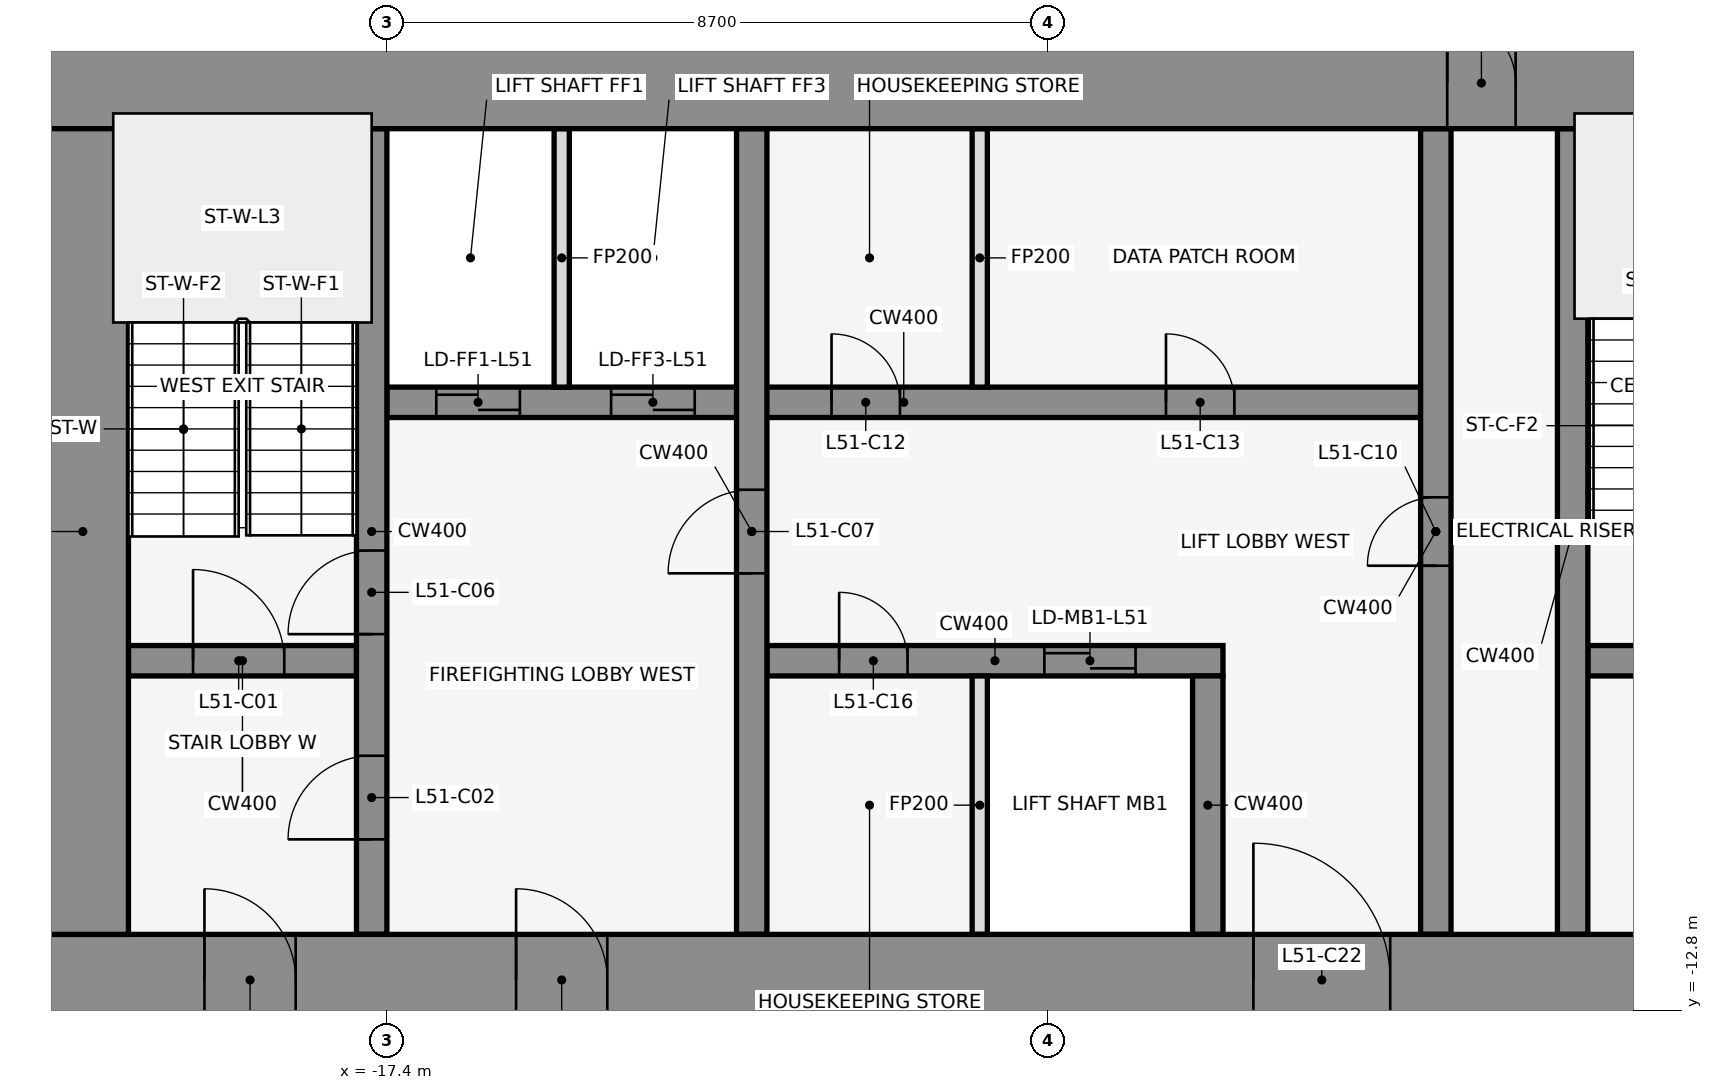
"""IFC4 building model, lengths in metres.
Left out: names, types, materials, properties, quantities, classifications, styles, units other than length and angle.
Written with IfcOpenShell. Run it as: python <this file> out.ifc"""

import sys

from ifc_helpers import new_model, si_unit, direction, frame, frame_2d, origin, place, context, subcontext, project, spatial, rectangle, extrude, element, fill, save


model = new_model("IFC4")
c1 = context("Model", 3, precision=1e-05, world=origin(), true_north=direction((0.0, 1.0)))
c2 = subcontext(c1, "Body", "Model", "MODEL_VIEW")
j1 = project(units=[si_unit("LENGTHUNIT", "METRE"), si_unit("PLANEANGLEUNIT", "RADIAN")], contexts=[c1])
p1 = place(None, origin())
s1 = spatial("IfcSite", under=j1, at=p1, CompositionType="ELEMENT")
p2 = place(p1, origin())
s2 = spatial("IfcBuilding", under=s1, at=p2, CompositionType="ELEMENT")
p3 = place(p2, frame((0.0, 0.0, 227.8)))
s3 = spatial("IfcBuildingStorey", under=s2, at=p3, CompositionType="ELEMENT", Elevation=227.8)
for number, where, z_axis, x_axis in (
    (1, (-0.068, -0.105, 0.0), (0.0, 0.0, 1.0), (-0.84, 0.543, 0.0)),
    (2, (-14.599, 1.08, 0.0), (0.0, 0.0, 1.0), (-0.84, -0.543, 0.0)),
):
    element("IfcWall", number, at=place(p3, frame(where, z_axis=z_axis, x_axis=x_axis)), inside=s3, PredefinedType="STANDARD", context=c2, shape_type="SweptSolid", body=[
        extrude(rectangle(XDim=2.183, YDim=0.25, at=frame_2d((1.091, 0.0))), origin(), (0.0, 0.0, 1.0), 3.95),
    ])
p4 = place(p3, frame((-20.8, -8.2, 0.0), z_axis=(0.0, 0.0, 1.0), x_axis=(1.0, 0.0, 0.0)))
e3 = element("IfcWall", 3, at=p4, inside=s3, PredefinedType="SHEAR", context=c2, shape_type="SweptSolid", body=[
    extrude(rectangle(XDim=3.0, YDim=0.4, at=frame_2d((1.5, 0.0))), origin(), (0.0, 0.0, 1.0), 4.1),
])
p5 = place(p4, frame((0.85, 0.0, 0.0)))
e4 = element("IfcOpeningElement", 4, at=p5, cuts=e3, PredefinedType="OPENING", context=c2, shape_type="SweptSolid", body=[
    extrude(rectangle(XDim=1.2, YDim=2.1, at=frame_2d((0.6, 1.05))), frame((0.0, 0.212, 0.0), z_axis=(0.0, -1.0, 0.0), x_axis=(1.0, 0.0, 0.0)), (0.0, 0.0, 1.0), 0.424),
])
p6 = place(p3, frame((-12.4, -8.2, 0.0), z_axis=(0.0, 0.0, 1.0), x_axis=(1.0, 0.0, 0.0)))
e5 = element("IfcWall", 5, at=p6, inside=s3, PredefinedType="SHEAR", context=c2, shape_type="SweptSolid", body=[
    extrude(rectangle(XDim=6.0, YDim=0.4, at=frame_2d((3.0, 0.0))), origin(), (0.0, 0.0, 1.0), 4.1),
])
p7 = place(p6, frame((3.65, 0.0, 0.0)))
e6 = element("IfcOpeningElement", 6, at=p7, cuts=e5, PredefinedType="OPENING", context=c2, shape_type="SweptSolid", body=[
    extrude(rectangle(XDim=1.2, YDim=2.1, at=frame_2d((0.6, 1.05))), frame((0.0, 0.212, 0.0), z_axis=(0.0, -1.0, 0.0), x_axis=(1.0, 0.0, 0.0)), (0.0, 0.0, 1.0), 0.424),
])
p8 = place(p6, frame((0.95, 0.0, 0.0)))
e7 = element("IfcOpeningElement", 7, at=p8, cuts=e5, PredefinedType="OPENING", context=c2, shape_type="SweptSolid", body=[
    extrude(rectangle(XDim=0.9, YDim=2.1, at=frame_2d((0.45, 1.05))), frame((0.0, 0.212, 0.0), z_axis=(0.0, -1.0, 0.0), x_axis=(1.0, 0.0, 0.0)), (0.0, 0.0, 1.0), 0.424),
])
p9 = place(p3, frame((-1.6, -8.2, 0.0), z_axis=(0.0, 0.0, 1.0), x_axis=(1.0, 0.0, 0.0)))
e8 = element("IfcWall", 8, at=p9, inside=s3, PredefinedType="SHEAR", context=c2, shape_type="SweptSolid", body=[
    extrude(rectangle(XDim=3.2, YDim=0.4, at=frame_2d((1.6, 0.0))), origin(), (0.0, 0.0, 1.0), 4.1),
])
p10 = place(p9, frame((1.05, 0.0, 0.0)))
e9 = element("IfcOpeningElement", 9, at=p10, cuts=e8, PredefinedType="OPENING", context=c2, shape_type="SweptSolid", body=[
    extrude(rectangle(XDim=1.2, YDim=2.1, at=frame_2d((0.6, 1.05))), frame((0.0, 0.212, 0.0), z_axis=(0.0, -1.0, 0.0), x_axis=(1.0, 0.0, 0.0)), (0.0, 0.0, 1.0), 0.424),
])
p11 = place(p3, frame((-17.4, -4.8, 0.0), z_axis=(0.0, 0.0, 1.0), x_axis=(1.0, 0.0, 0.0)))
e10 = element("IfcWall", 10, at=p11, inside=s3, PredefinedType="SHEAR", context=c2, shape_type="SweptSolid", body=[
    extrude(rectangle(XDim=13.6, YDim=0.4, at=frame_2d((6.8, 0.0))), origin(), (0.0, 0.0, 1.0), 4.1),
])
p12 = place(p11, frame((0.65, 0.0, 0.0)))
e11 = element("IfcOpeningElement", 11, at=p12, cuts=e10, PredefinedType="OPENING", context=c2, shape_type="SweptSolid", body=[
    extrude(rectangle(XDim=1.1, YDim=2.1, at=frame_2d((0.55, 1.05))), frame((0.0, 0.212, 0.0), z_axis=(0.0, -1.0, 0.0), x_axis=(1.0, 0.0, 0.0)), (0.0, 0.0, 1.0), 0.424),
])
p13 = place(p11, frame((2.95, 0.0, 0.0)))
e12 = element("IfcOpeningElement", 12, at=p13, cuts=e10, PredefinedType="OPENING", context=c2, shape_type="SweptSolid", body=[
    extrude(rectangle(XDim=1.1, YDim=2.1, at=frame_2d((0.55, 1.05))), frame((0.0, 0.212, 0.0), z_axis=(0.0, -1.0, 0.0), x_axis=(1.0, 0.0, 0.0)), (0.0, 0.0, 1.0), 0.424),
])
p14 = place(p11, frame((5.85, 0.0, 0.0)))
e13 = element("IfcOpeningElement", 13, at=p14, cuts=e10, PredefinedType="OPENING", context=c2, shape_type="SweptSolid", body=[
    extrude(rectangle(XDim=0.9, YDim=2.1, at=frame_2d((0.45, 1.05))), frame((0.0, 0.212, 0.0), z_axis=(0.0, -1.0, 0.0), x_axis=(1.0, 0.0, 0.0)), (0.0, 0.0, 1.0), 0.424),
])
p15 = place(p11, frame((10.25, 0.0, 0.0)))
e14 = element("IfcOpeningElement", 14, at=p15, cuts=e10, PredefinedType="OPENING", context=c2, shape_type="SweptSolid", body=[
    extrude(rectangle(XDim=0.9, YDim=2.1, at=frame_2d((0.45, 1.05))), frame((0.0, 0.212, 0.0), z_axis=(0.0, -1.0, 0.0), x_axis=(1.0, 0.0, 0.0)), (0.0, 0.0, 1.0), 0.424),
])
p16 = place(p3, frame((-17.6, -11.8, 0.0), z_axis=(0.0, 0.0, 1.0), x_axis=(0.0, 1.0, 0.0)))
e15 = element("IfcWall", 15, at=p16, inside=s3, PredefinedType="SHEAR", context=c2, shape_type="SweptSolid", body=[
    extrude(rectangle(XDim=10.6, YDim=0.4, at=frame_2d((5.3, 0.0))), origin(), (0.0, 0.0, 1.0), 4.1),
])
p17 = place(p16, frame((1.25, 0.0, 0.0)))
e16 = element("IfcOpeningElement", 16, at=p17, cuts=e15, PredefinedType="OPENING", context=c2, shape_type="SweptSolid", body=[
    extrude(rectangle(XDim=1.1, YDim=2.1, at=frame_2d((0.55, 1.05))), frame((0.0, 0.212, 0.0), z_axis=(0.0, -1.0, 0.0), x_axis=(1.0, 0.0, 0.0)), (0.0, 0.0, 1.0), 0.424),
])
p18 = place(p16, frame((3.95, 0.0, 0.0)))
e17 = element("IfcOpeningElement", 17, at=p18, cuts=e15, PredefinedType="OPENING", context=c2, shape_type="SweptSolid", body=[
    extrude(rectangle(XDim=1.1, YDim=2.1, at=frame_2d((0.55, 1.05))), frame((0.0, 0.212, 0.0), z_axis=(0.0, -1.0, 0.0), x_axis=(1.0, 0.0, 0.0)), (0.0, 0.0, 1.0), 0.424),
])
p19 = place(p3, frame((-15.1, -4.6, 0.0), z_axis=(0.0, 0.0, 1.0), x_axis=(0.0, 1.0, 0.0)))
e18 = element("IfcWall", 18, at=p19, inside=s3, PredefinedType="PARTITIONING", context=c2, shape_type="SweptSolid", body=[
    extrude(rectangle(XDim=3.4, YDim=0.2, at=frame_2d((1.7, 0.0))), origin(), (0.0, 0.0, 1.0), 2.84),
])
p20 = place(p3, frame((-12.6, -11.8, 0.0), z_axis=(0.0, 0.0, 1.0), x_axis=(0.0, 1.0, 0.0)))
e19 = element("IfcWall", 19, at=p20, inside=s3, PredefinedType="SHEAR", context=c2, shape_type="SweptSolid", body=[
    extrude(rectangle(XDim=10.6, YDim=0.4, at=frame_2d((5.3, 0.0))), origin(), (0.0, 0.0, 1.0), 4.1),
])
p21 = place(p20, frame((4.75, 0.0, 0.0)))
e20 = element("IfcOpeningElement", 20, at=p21, cuts=e19, PredefinedType="OPENING", context=c2, shape_type="SweptSolid", body=[
    extrude(rectangle(XDim=1.1, YDim=2.1, at=frame_2d((0.55, 1.05))), frame((0.0, 0.212, 0.0), z_axis=(0.0, -1.0, 0.0), x_axis=(1.0, 0.0, 0.0)), (0.0, 0.0, 1.0), 0.424),
])
for number, where, z_axis, x_axis in (
    (21, (-9.6, -11.8, 0.0), (0.0, 0.0, 1.0), (0.0, 1.0, 0.0)),
    (22, (-9.6, -4.6, 0.0), (0.0, 0.0, 1.0), (0.0, 1.0, 0.0)),
):
    element("IfcWall", number, at=place(p3, frame(where, z_axis=z_axis, x_axis=x_axis)), inside=s3, PredefinedType="PARTITIONING", context=c2, shape_type="SweptSolid", body=[
        extrude(rectangle(XDim=3.4, YDim=0.2, at=frame_2d((1.7, 0.0))), origin(), (0.0, 0.0, 1.0), 2.84),
    ])
p22 = place(p3, frame((-6.6, -11.8, 0.0), z_axis=(0.0, 0.0, 1.0), x_axis=(0.0, 1.0, 0.0)))
e23 = element("IfcWall", 23, at=p22, inside=s3, PredefinedType="SHEAR", context=c2, shape_type="SweptSolid", body=[
    extrude(rectangle(XDim=3.4, YDim=0.4, at=frame_2d((1.7, 0.0))), origin(), (0.0, 0.0, 1.0), 4.1),
])
p23 = place(p3, frame((-3.6, -11.8, 0.0), z_axis=(0.0, 0.0, 1.0), x_axis=(0.0, 1.0, 0.0)))
e24 = element("IfcWall", 24, at=p23, inside=s3, PredefinedType="SHEAR", context=c2, shape_type="SweptSolid", body=[
    extrude(rectangle(XDim=10.6, YDim=0.4, at=frame_2d((5.3, 0.0))), origin(), (0.0, 0.0, 1.0), 4.1),
])
p24 = place(p23, frame((4.85, 0.0, 0.0)))
e25 = element("IfcOpeningElement", 25, at=p24, cuts=e24, PredefinedType="OPENING", context=c2, shape_type="SweptSolid", body=[
    extrude(rectangle(XDim=0.9, YDim=2.1, at=frame_2d((0.45, 1.05))), frame((0.0, 0.212, 0.0), z_axis=(0.0, -1.0, 0.0), x_axis=(1.0, 0.0, 0.0)), (0.0, 0.0, 1.0), 0.424),
])
p25 = place(p3, frame((-1.8, -11.8, 0.0), z_axis=(0.0, 0.0, 1.0), x_axis=(0.0, 1.0, 0.0)))
e26 = element("IfcWall", 26, at=p25, inside=s3, PredefinedType="SHEAR", context=c2, shape_type="SweptSolid", body=[
    extrude(rectangle(XDim=10.6, YDim=0.4, at=frame_2d((5.3, 0.0))), origin(), (0.0, 0.0, 1.0), 4.1),
])
p26 = place(p3, frame((-22.0, -0.6, 0.0), z_axis=(0.0, 0.0, 1.0), x_axis=(1.0, 0.0, 0.0)))
e27 = element("IfcWall", 27, at=p26, inside=s3, PredefinedType="SHEAR", context=c2, shape_type="SweptSolid", body=[
    extrude(rectangle(XDim=44.0, YDim=1.2, at=frame_2d((22.0, 0.0))), origin(), (0.0, 0.0, 1.0), 4.1),
])
p27 = place(p26, frame((18.55, 0.0, 0.0)))
e28 = element("IfcOpeningElement", 28, at=p27, cuts=e27, PredefinedType="OPENING", context=c2, shape_type="SweptSolid", body=[
    extrude(rectangle(XDim=0.9, YDim=2.1, at=frame_2d((0.45, 1.05))), frame((0.0, 0.612, 0.0), z_axis=(0.0, -1.0, 0.0), x_axis=(1.0, 0.0, 0.0)), (0.0, 0.0, 1.0), 1.224),
])
p28 = place(p26, frame((24.55, 0.0, 0.0)))
e29 = element("IfcOpeningElement", 29, at=p28, cuts=e27, PredefinedType="OPENING", context=c2, shape_type="SweptSolid", body=[
    extrude(rectangle(XDim=0.9, YDim=2.1, at=frame_2d((0.45, 1.05))), frame((0.0, 0.612, 0.0), z_axis=(0.0, -1.0, 0.0), x_axis=(1.0, 0.0, 0.0)), (0.0, 0.0, 1.0), 1.224),
])
p29 = place(p3, frame((-22.0, -12.4, 0.0), z_axis=(0.0, 0.0, 1.0), x_axis=(1.0, 0.0, 0.0)))
e30 = element("IfcWall", 30, at=p29, inside=s3, PredefinedType="SHEAR", context=c2, shape_type="SweptSolid", body=[
    extrude(rectangle(XDim=44.0, YDim=1.2, at=frame_2d((22.0, 0.0))), origin(), (0.0, 0.0, 1.0), 4.1),
])
p30 = place(p29, frame((2.2, 0.0, 0.0)))
e31 = element("IfcOpeningElement", 31, at=p30, cuts=e30, PredefinedType="OPENING", context=c2, shape_type="SweptSolid", body=[
    extrude(rectangle(XDim=1.2, YDim=2.1, at=frame_2d((0.6, 1.05))), frame((0.0, 0.612, 0.0), z_axis=(0.0, -1.0, 0.0), x_axis=(1.0, 0.0, 0.0)), (0.0, 0.0, 1.0), 1.224),
])
p31 = place(p29, frame((21.4, 0.0, 0.0)))
e32 = element("IfcOpeningElement", 32, at=p31, cuts=e30, PredefinedType="OPENING", context=c2, shape_type="SweptSolid", body=[
    extrude(rectangle(XDim=1.2, YDim=2.1, at=frame_2d((0.6, 1.05))), frame((0.0, 0.612, 0.0), z_axis=(0.0, -1.0, 0.0), x_axis=(1.0, 0.0, 0.0)), (0.0, 0.0, 1.0), 1.224),
])
p32 = place(p29, frame((40.6, 0.0, 0.0)))
e33 = element("IfcOpeningElement", 33, at=p32, cuts=e30, PredefinedType="OPENING", context=c2, shape_type="SweptSolid", body=[
    extrude(rectangle(XDim=1.2, YDim=2.1, at=frame_2d((0.6, 1.05))), frame((0.0, 0.612, 0.0), z_axis=(0.0, -1.0, 0.0), x_axis=(1.0, 0.0, 0.0)), (0.0, 0.0, 1.0), 1.224),
])
p33 = place(p29, frame((16.0, 0.0, 0.0)))
e34 = element("IfcOpeningElement", 34, at=p33, cuts=e30, PredefinedType="OPENING", context=c2, shape_type="SweptSolid", body=[
    extrude(rectangle(XDim=1.8, YDim=2.1, at=frame_2d((0.9, 1.05))), frame((0.0, 0.612, 0.0), z_axis=(0.0, -1.0, 0.0), x_axis=(1.0, 0.0, 0.0)), (0.0, 0.0, 1.0), 1.224),
])
p34 = place(p29, frame((6.3, 0.0, 0.0)))
e35 = element("IfcOpeningElement", 35, at=p34, cuts=e30, PredefinedType="OPENING", context=c2, shape_type="SweptSolid", body=[
    extrude(rectangle(XDim=1.2, YDim=2.1, at=frame_2d((0.6, 1.05))), frame((0.0, 0.612, 0.0), z_axis=(0.0, -1.0, 0.0), x_axis=(1.0, 0.0, 0.0)), (0.0, 0.0, 1.0), 1.224),
])
p35 = place(p29, frame((26.2, 0.0, 0.0)))
e36 = element("IfcOpeningElement", 36, at=p35, cuts=e30, PredefinedType="OPENING", context=c2, shape_type="SweptSolid", body=[
    extrude(rectangle(XDim=1.8, YDim=2.1, at=frame_2d((0.9, 1.05))), frame((0.0, 0.612, 0.0), z_axis=(0.0, -1.0, 0.0), x_axis=(1.0, 0.0, 0.0)), (0.0, 0.0, 1.0), 1.224),
])
p36 = place(p29, frame((36.5, 0.0, 0.0)))
e37 = element("IfcOpeningElement", 37, at=p36, cuts=e30, PredefinedType="OPENING", context=c2, shape_type="SweptSolid", body=[
    extrude(rectangle(XDim=1.2, YDim=2.1, at=frame_2d((0.6, 1.05))), frame((0.0, 0.612, 0.0), z_axis=(0.0, -1.0, 0.0), x_axis=(1.0, 0.0, 0.0)), (0.0, 0.0, 1.0), 1.224),
])
p37 = place(p3, frame((-21.4, -11.8, 0.0), z_axis=(0.0, 0.0, 1.0), x_axis=(0.0, 1.0, 0.0)))
e38 = element("IfcWall", 38, at=p37, inside=s3, PredefinedType="SHEAR", context=c2, shape_type="SweptSolid", body=[
    extrude(rectangle(XDim=10.6, YDim=1.2, at=frame_2d((5.3, 0.0))), origin(), (0.0, 0.0, 1.0), 4.1),
])
p38 = place(p5, origin())
e39 = element("IfcDoor", 39, at=p38, inside=s3, OperationType="SINGLE_SWING_LEFT", PredefinedType="DOOR", context=c2, shape_type="SweptSolid", body=[
    extrude(rectangle(XDim=1.2, YDim=2.1, at=frame_2d((0.6, 1.05))), frame((0.0, 0.025, 0.0), z_axis=(0.0, -1.0, 0.0), x_axis=(1.0, 0.0, 0.0)), (0.0, 0.0, 1.0), 0.05),
])
fill(e4, e39)
p39 = place(p17, frame((1.1, 0.0, 0.0), z_axis=(0.0, 0.0, 1.0), x_axis=(-1.0, 0.0, 0.0)))
e40 = element("IfcDoor", 40, at=p39, inside=s3, OperationType="SINGLE_SWING_LEFT", PredefinedType="DOOR", context=c2, shape_type="SweptSolid", body=[
    extrude(rectangle(XDim=1.1, YDim=2.1, at=frame_2d((0.55, 1.05))), frame((0.0, 0.025, 0.0), z_axis=(0.0, -1.0, 0.0), x_axis=(1.0, 0.0, 0.0)), (0.0, 0.0, 1.0), 0.05),
])
fill(e16, e40)
p40 = place(p12, origin())
e41 = element("IfcDoor", 41, at=p40, inside=s3, OperationType="DOUBLE_DOOR_SLIDING", PredefinedType="DOOR", context=c2, shape_type="SweptSolid", body=[
    extrude(rectangle(XDim=1.1, YDim=2.1, at=frame_2d((0.55, 1.05))), frame((0.0, 0.025, 0.0), z_axis=(0.0, -1.0, 0.0), x_axis=(1.0, 0.0, 0.0)), (0.0, 0.0, 1.0), 0.05),
])
fill(e11, e41)
p41 = place(p13, origin())
e42 = element("IfcDoor", 42, at=p41, inside=s3, OperationType="DOUBLE_DOOR_SLIDING", PredefinedType="DOOR", context=c2, shape_type="SweptSolid", body=[
    extrude(rectangle(XDim=1.1, YDim=2.1, at=frame_2d((0.55, 1.05))), frame((0.0, 0.025, 0.0), z_axis=(0.0, -1.0, 0.0), x_axis=(1.0, 0.0, 0.0)), (0.0, 0.0, 1.0), 0.05),
])
fill(e12, e42)
p42 = place(p7, origin())
e43 = element("IfcDoor", 43, at=p42, inside=s3, OperationType="DOUBLE_DOOR_SLIDING", PredefinedType="DOOR", context=c2, shape_type="SweptSolid", body=[
    extrude(rectangle(XDim=1.2, YDim=2.1, at=frame_2d((0.6, 1.05))), frame((0.0, 0.025, 0.0), z_axis=(0.0, -1.0, 0.0), x_axis=(1.0, 0.0, 0.0)), (0.0, 0.0, 1.0), 0.05),
])
fill(e6, e43)
p43 = place(p18, frame((1.1, 0.0, 0.0), z_axis=(0.0, 0.0, 1.0), x_axis=(-1.0, 0.0, 0.0)))
e44 = element("IfcDoor", 44, at=p43, inside=s3, OperationType="SINGLE_SWING_LEFT", PredefinedType="DOOR", context=c2, shape_type="SweptSolid", body=[
    extrude(rectangle(XDim=1.1, YDim=2.1, at=frame_2d((0.55, 1.05))), frame((0.0, 0.025, 0.0), z_axis=(0.0, -1.0, 0.0), x_axis=(1.0, 0.0, 0.0)), (0.0, 0.0, 1.0), 0.05),
])
fill(e17, e44)
p44 = place(p21, origin())
e45 = element("IfcDoor", 45, at=p44, inside=s3, OperationType="SINGLE_SWING_LEFT", PredefinedType="DOOR", context=c2, shape_type="SweptSolid", body=[
    extrude(rectangle(XDim=1.1, YDim=2.1, at=frame_2d((0.55, 1.05))), frame((0.0, 0.025, 0.0), z_axis=(0.0, -1.0, 0.0), x_axis=(1.0, 0.0, 0.0)), (0.0, 0.0, 1.0), 0.05),
])
fill(e20, e45)
p45 = place(p24, frame((0.9, 0.0, 0.0), z_axis=(0.0, 0.0, 1.0), x_axis=(-1.0, 0.0, 0.0)))
e46 = element("IfcDoor", 46, at=p45, inside=s3, OperationType="SINGLE_SWING_LEFT", PredefinedType="DOOR", context=c2, shape_type="SweptSolid", body=[
    extrude(rectangle(XDim=0.9, YDim=2.1, at=frame_2d((0.45, 1.05))), frame((0.0, 0.025, 0.0), z_axis=(0.0, -1.0, 0.0), x_axis=(1.0, 0.0, 0.0)), (0.0, 0.0, 1.0), 0.05),
])
fill(e25, e46)
p46 = place(p14, origin())
e47 = element("IfcDoor", 47, at=p46, inside=s3, OperationType="SINGLE_SWING_RIGHT", PredefinedType="DOOR", context=c2, shape_type="SweptSolid", body=[
    extrude(rectangle(XDim=0.9, YDim=2.1, at=frame_2d((0.45, 1.05))), frame((0.0, 0.025, 0.0), z_axis=(0.0, -1.0, 0.0), x_axis=(1.0, 0.0, 0.0)), (0.0, 0.0, 1.0), 0.05),
])
fill(e13, e47)
p47 = place(p15, origin())
e48 = element("IfcDoor", 48, at=p47, inside=s3, OperationType="SINGLE_SWING_LEFT", PredefinedType="DOOR", context=c2, shape_type="SweptSolid", body=[
    extrude(rectangle(XDim=0.9, YDim=2.1, at=frame_2d((0.45, 1.05))), frame((0.0, 0.025, 0.0), z_axis=(0.0, -1.0, 0.0), x_axis=(1.0, 0.0, 0.0)), (0.0, 0.0, 1.0), 0.05),
])
fill(e14, e48)
p48 = place(p8, frame((0.9, 0.0, 0.0), z_axis=(0.0, 0.0, 1.0), x_axis=(-1.0, 0.0, 0.0)))
e49 = element("IfcDoor", 49, at=p48, inside=s3, OperationType="SINGLE_SWING_LEFT", PredefinedType="DOOR", context=c2, shape_type="SweptSolid", body=[
    extrude(rectangle(XDim=0.9, YDim=2.1, at=frame_2d((0.45, 1.05))), frame((0.0, 0.025, 0.0), z_axis=(0.0, -1.0, 0.0), x_axis=(1.0, 0.0, 0.0)), (0.0, 0.0, 1.0), 0.05),
])
fill(e7, e49)
p49 = place(p27, origin())
e50 = element("IfcDoor", 50, at=p49, inside=s3, OperationType="SINGLE_SWING_LEFT", PredefinedType="DOOR", context=c2, shape_type="SweptSolid", body=[
    extrude(rectangle(XDim=0.9, YDim=2.1, at=frame_2d((0.45, 1.05))), frame((0.0, 0.025, 0.0), z_axis=(0.0, -1.0, 0.0), x_axis=(1.0, 0.0, 0.0)), (0.0, 0.0, 1.0), 0.05),
])
fill(e28, e50)
p50 = place(p30, frame((1.2, 0.0, 0.0), z_axis=(0.0, 0.0, 1.0), x_axis=(-1.0, 0.0, 0.0)))
e51 = element("IfcDoor", 51, at=p50, inside=s3, OperationType="SINGLE_SWING_RIGHT", PredefinedType="DOOR", context=c2, shape_type="SweptSolid", body=[
    extrude(rectangle(XDim=1.2, YDim=2.1, at=frame_2d((0.6, 1.05))), frame((0.0, 0.025, 0.0), z_axis=(0.0, -1.0, 0.0), x_axis=(1.0, 0.0, 0.0)), (0.0, 0.0, 1.0), 0.05),
])
fill(e31, e51)
p51 = place(p33, origin())
e52 = element("IfcDoor", 52, at=p51, inside=s3, OperationType="SINGLE_SWING_LEFT", PredefinedType="DOOR", context=c2, shape_type="SweptSolid", body=[
    extrude(rectangle(XDim=1.8, YDim=2.1, at=frame_2d((0.9, 1.05))), frame((0.0, 0.025, 0.0), z_axis=(0.0, -1.0, 0.0), x_axis=(1.0, 0.0, 0.0)), (0.0, 0.0, 1.0), 0.05),
])
fill(e34, e52)
p52 = place(p34, frame((1.2, 0.0, 0.0), z_axis=(0.0, 0.0, 1.0), x_axis=(-1.0, 0.0, 0.0)))
e53 = element("IfcDoor", 53, at=p52, inside=s3, OperationType="SINGLE_SWING_RIGHT", PredefinedType="DOOR", context=c2, shape_type="SweptSolid", body=[
    extrude(rectangle(XDim=1.2, YDim=2.1, at=frame_2d((0.6, 1.05))), frame((0.0, 0.025, 0.0), z_axis=(0.0, -1.0, 0.0), x_axis=(1.0, 0.0, 0.0)), (0.0, 0.0, 1.0), 0.05),
])
fill(e35, e53)
save(model, sys.argv[1])
